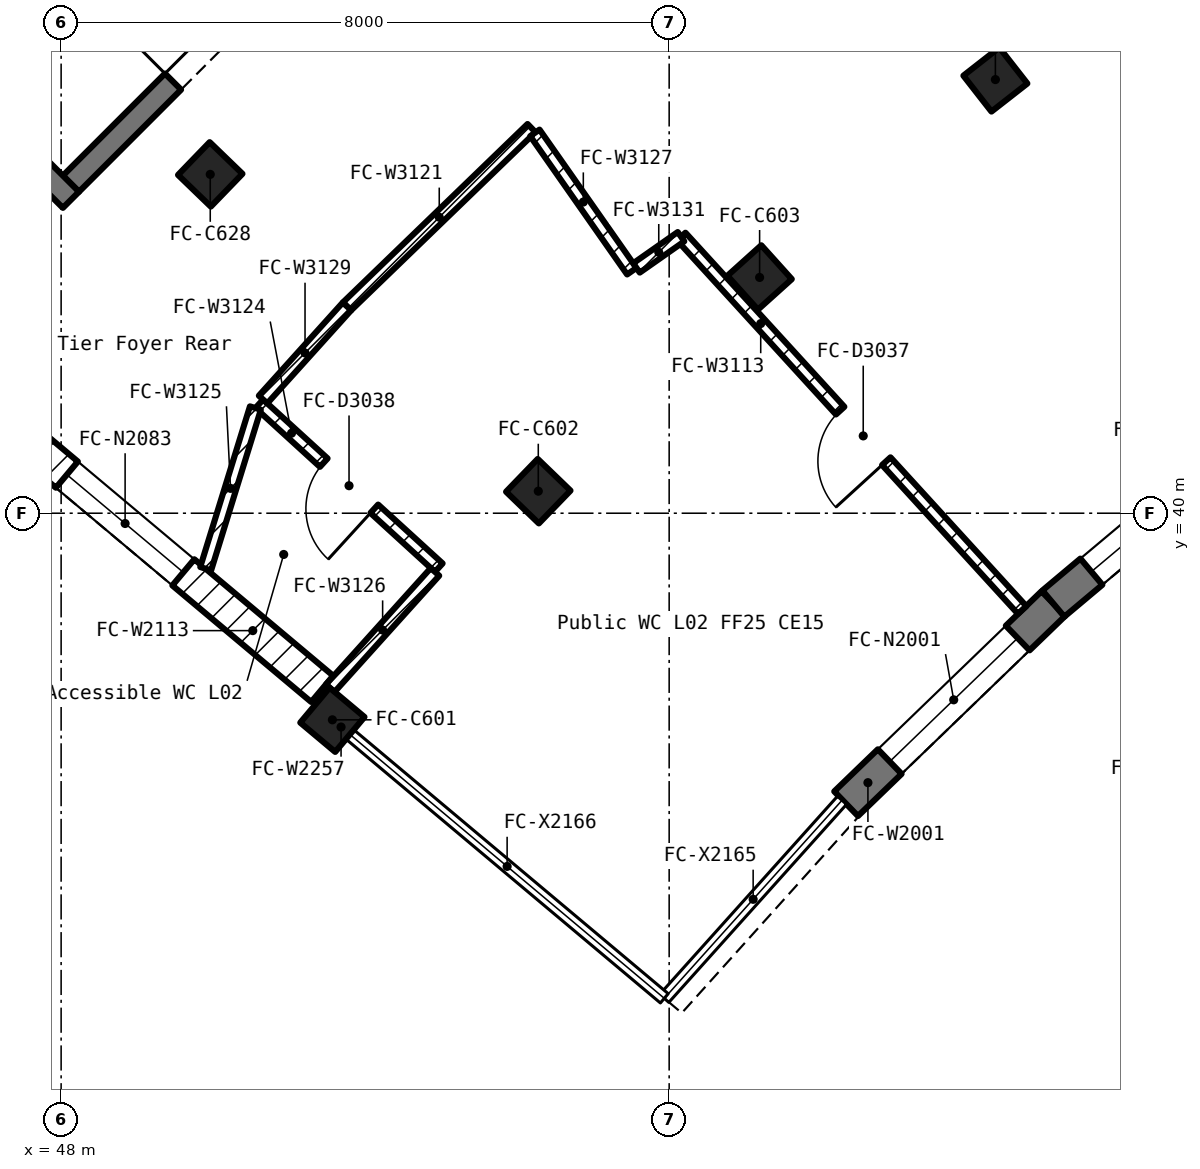
"""IFC4 building model, lengths in metres.
Left out: names, types, materials, properties, quantities, classifications, styles, units other than length and angle.
Written with IfcOpenShell. Run it as: python <this file> out.ifc"""

import sys

from ifc_helpers import new_model, si_unit, direction, frame, frame_2d, origin, origin_2d, place, context, subcontext, project, spatial, rectangle, extrude, element, fill, save


model = new_model("IFC4")
c1 = context("Model", 3, precision=1e-05, world=origin(), true_north=direction((0.0, 1.0)))
c2 = subcontext(c1, "Body", "Model", "MODEL_VIEW")
j1 = project(units=[si_unit("LENGTHUNIT", "METRE"), si_unit("PLANEANGLEUNIT", "RADIAN")], contexts=[c1])
p1 = place(None, origin())
s1 = spatial("IfcSite", under=j1, at=p1, CompositionType="ELEMENT")
p2 = place(p1, origin())
s2 = spatial("IfcBuilding", under=s1, at=p2, CompositionType="ELEMENT")
p3 = place(p2, frame((0.0, 0.0, 11.5)))
s3 = spatial("IfcBuildingStorey", under=s2, at=p3, CompositionType="ELEMENT", Elevation=11.5)
for number, where, z_axis, x_axis in (
    (1, (51.569, 37.282, 0.0), (0.0, 0.0, 1.0), (0.643, 0.766, 0.0)),
    (2, (54.278, 40.29, 0.0), (0.0, 0.0, 1.0), (0.695, 0.719, 0.0)),
    (3, (57.19, 43.102, 0.0), (0.0, 0.0, 1.0), (0.743, 0.669, 0.0)),
    (4, (60.292, 45.705, 0.0), (0.0, 0.0, 1.0), (0.788, 0.616, 0.0)),
    (5, (49.962, 44.458, 0.0), (0.0, 0.0, 1.0), (0.695, 0.719, 0.0)),
):
    element("IfcColumn", number, at=place(p3, frame(where, z_axis=z_axis, x_axis=x_axis)), inside=s3, PredefinedType="COLUMN", context=c2, shape_type="SweptSolid", body=[
        extrude(rectangle(XDim=0.6, YDim=0.6, at=origin_2d()), origin(), (0.0, 0.0, 1.0), 5.5),
    ])
p4 = place(p3, frame((58.328, 36.178, 0.0), z_axis=(0.0, 0.0, 1.0), x_axis=(0.719395911917, 0.694600260522, 0.0)))
e6 = element("IfcWall", 6, at=p4, inside=s3, PredefinedType="SOLIDWALL", context=c2, shape_type="SweptSolid", body=[
    extrude(rectangle(XDim=3.791, YDim=0.45, at=frame_2d((1.896, 0.0))), origin(), (0.0, 0.0, 1.0), 5.5),
])
p5 = place(p4, frame((0.798, 0.0, 0.9)))
e7 = element("IfcOpeningElement", 7, at=p5, cuts=e6, PredefinedType="OPENING", context=c2, shape_type="SweptSolid", body=[
    extrude(rectangle(XDim=2.34, YDim=3.4, at=frame_2d((1.17, 1.7))), frame((0.0, 0.237, 0.0), z_axis=(0.0, -1.0, 0.0), x_axis=(1.0, 0.0, 0.0)), (0.0, 0.0, 1.0), 0.474),
])
p6 = place(p3, frame((61.055, 38.811, 0.0), z_axis=(0.0, 0.0, 1.0), x_axis=(0.766009592259, 0.642829141038, 0.0)))
e8 = element("IfcWall", 8, at=p6, inside=s3, PredefinedType="SOLIDWALL", context=c2, shape_type="SweptSolid", body=[
    extrude(rectangle(XDim=3.645, YDim=0.45, at=frame_2d((1.822, 0.0))), origin(), (0.0, 0.0, 1.0), 5.5),
])
p7 = place(p6, frame((0.653, 0.0, 0.9)))
e9 = element("IfcOpeningElement", 9, at=p7, cuts=e8, PredefinedType="OPENING", context=c2, shape_type="SweptSolid", body=[
    extrude(rectangle(XDim=2.34, YDim=3.4, at=frame_2d((1.17, 1.7))), frame((0.0, 0.237, 0.0), z_axis=(0.0, -1.0, 0.0), x_axis=(1.0, 0.0, 0.0)), (0.0, 0.0, 1.0), 0.474),
])
p8 = place(p3, frame((51.435, 37.689, 0.0), z_axis=(0.0, 0.0, 1.0), x_axis=(-0.766076492063, 0.642749413308, 0.0)))
e10 = element("IfcWall", 10, at=p8, inside=s3, PredefinedType="SOLIDWALL", context=c2, shape_type="SweptSolid", body=[
    extrude(rectangle(XDim=6.236, YDim=0.45, at=frame_2d((3.118, 0.0))), origin(), (0.0, 0.0, 1.0), 4.48),
])
p9 = place(p8, frame((2.385, 0.0, 1.0)))
e11 = element("IfcOpeningElement", 11, at=p9, cuts=e10, PredefinedType="OPENING", context=c2, shape_type="SweptSolid", body=[
    extrude(rectangle(XDim=2.0, YDim=2.8, at=frame_2d((1.0, 1.4))), frame((0.0, 0.237, 0.0), z_axis=(0.0, -1.0, 0.0), x_axis=(1.0, 0.0, 0.0)), (0.0, 0.0, 1.0), 0.474),
])
p10 = place(p3, frame((48.129, 44.335, 0.0), z_axis=(0.0, 0.0, 1.0), x_axis=(0.707106781187, 0.707106781187, 0.0)))
e12 = element("IfcWall", 12, at=p10, inside=s3, PredefinedType="SOLIDWALL", context=c2, shape_type="SweptSolid", body=[
    extrude(rectangle(XDim=5.001, YDim=0.3, at=frame_2d((2.5, 0.0))), origin(), (0.0, 0.0, 1.0), 5.5),
])
p11 = place(p10, frame((1.9, 0.0, 0.0)))
e13 = element("IfcOpeningElement", 13, at=p11, cuts=e12, PredefinedType="OPENING", context=c2, shape_type="SweptSolid", body=[
    extrude(rectangle(XDim=1.2, YDim=2.1, at=frame_2d((0.6, 1.05))), frame((0.0, 0.162, 0.0), z_axis=(0.0, -1.0, 0.0), x_axis=(1.0, 0.0, 0.0)), (0.0, 0.0, 1.0), 0.324),
])
p12 = place(p3, frame((41.058, 51.194, 0.0), z_axis=(0.0, 0.0, 1.0), x_axis=(0.7070945738, -0.707118988363, 0.0)))
e14 = element("IfcWall", 14, at=p12, inside=s3, PredefinedType="SOLIDWALL", context=c2, shape_type="SweptSolid", body=[
    extrude(rectangle(XDim=10.0, YDim=0.3, at=frame_2d((5.0, 0.0))), origin(), (0.0, 0.0, 1.0), 5.5),
])
p13 = place(p3, frame((60.644, 38.727, 0.0), z_axis=(0.0, 0.0, 1.0), x_axis=(-0.674225851887, 0.738525220049, 0.0)))
e15 = element("IfcWall", 15, at=p13, inside=s3, PredefinedType="PARTITIONING", context=c2, shape_type="SweptSolid", body=[
    extrude(rectangle(XDim=6.652, YDim=0.15, at=frame_2d((3.326, 0.0))), origin(), (0.0, 0.0, 1.0), 4.35),
])
p14 = place(p13, frame((2.651, 0.0, 0.0)))
e16 = element("IfcOpeningElement", 16, at=p14, cuts=e15, PredefinedType="OPENING", context=c2, shape_type="SweptSolid", body=[
    extrude(rectangle(XDim=0.9, YDim=2.1, at=frame_2d((0.45, 1.05))), frame((0.0, 0.087, 0.0), z_axis=(0.0, -1.0, 0.0), x_axis=(1.0, 0.0, 0.0)), (0.0, 0.0, 1.0), 0.174),
])
p15 = place(p3, frame((54.189, 45.067, 0.0), z_axis=(0.0, 0.0, 1.0), x_axis=(-0.719150966755, -0.694853860186, 0.0)))
e17 = element("IfcWall", 17, at=p15, inside=s3, PredefinedType="PARTITIONING", context=c2, shape_type="SweptSolid", body=[
    extrude(rectangle(XDim=3.376, YDim=0.15, at=frame_2d((1.688, 0.0))), origin(), (0.0, 0.0, 1.0), 4.38),
])
p16 = place(p3, frame((52.969, 39.284, 0.0), z_axis=(0.0, 0.0, 1.0), x_axis=(-0.738587953928, 0.6741571288, 0.0)))
e18 = element("IfcWall", 18, at=p16, inside=s3, PredefinedType="PARTITIONING", context=c2, shape_type="SweptSolid", body=[
    extrude(rectangle(XDim=3.198, YDim=0.15, at=frame_2d((1.599, 0.0))), origin(), (0.0, 0.0, 1.0), 4.38),
])
p17 = place(p16, frame((1.149, 0.0, 0.0)))
e19 = element("IfcOpeningElement", 19, at=p17, cuts=e18, PredefinedType="OPENING", context=c2, shape_type="SweptSolid", body=[
    extrude(rectangle(XDim=0.9, YDim=2.1, at=frame_2d((0.45, 1.05))), frame((0.0, 0.087, 0.0), z_axis=(0.0, -1.0, 0.0), x_axis=(1.0, 0.0, 0.0)), (0.0, 0.0, 1.0), 0.174),
])
p18 = place(p3, frame((50.556, 41.384, 0.0), z_axis=(0.0, 0.0, 1.0), x_axis=(-0.295465570402, -0.955353388389, 0.0)))
e20 = element("IfcWall", 20, at=p18, inside=s3, PredefinedType="PARTITIONING", context=c2, shape_type="SweptSolid", body=[
    extrude(rectangle(XDim=2.213, YDim=0.15, at=frame_2d((1.106, 0.0))), origin(), (0.0, 0.0, 1.0), 4.38),
])
p19 = place(p3, frame((51.541, 37.698, 0.0), z_axis=(0.0, 0.0, 1.0), x_axis=(0.669207075993, 0.743075964785, 0.0)))
e21 = element("IfcWall", 21, at=p19, inside=s3, PredefinedType="PARTITIONING", context=c2, shape_type="SweptSolid", body=[
    extrude(rectangle(XDim=2.059, YDim=0.15, at=frame_2d((1.03, 0.0))), origin(), (0.0, 0.0, 1.0), 4.38),
])
p20 = place(p3, frame((55.508, 43.184, 0.0), z_axis=(0.0, 0.0, 1.0), x_axis=(-0.57384571694, 0.818963426014, 0.0)))
e22 = element("IfcWall", 22, at=p20, inside=s3, PredefinedType="PARTITIONING", context=c2, shape_type="SweptSolid", body=[
    extrude(rectangle(XDim=2.222, YDim=0.15, at=frame_2d((1.111, 0.0))), origin(), (0.0, 0.0, 1.0), 4.38),
])
p21 = place(p3, frame((51.761, 42.721, 0.0), z_axis=(0.0, 0.0, 1.0), x_axis=(-0.669512605136, -0.742800694375, 0.0)))
e23 = element("IfcWall", 23, at=p21, inside=s3, PredefinedType="PARTITIONING", context=c2, shape_type="SweptSolid", body=[
    extrude(rectangle(XDim=1.649, YDim=0.15, at=frame_2d((0.824, 0.0))), origin(), (0.0, 0.0, 1.0), 4.38),
])
p22 = place(p3, frame((56.156, 43.638, 0.0), z_axis=(0.0, 0.0, 1.0), x_axis=(-0.818750822524, -0.574149014295, 0.0)))
e24 = element("IfcWall", 24, at=p22, inside=s3, PredefinedType="PARTITIONING", context=c2, shape_type="SweptSolid", body=[
    extrude(rectangle(XDim=0.716, YDim=0.15, at=frame_2d((0.358, 0.0))), origin(), (0.0, 0.0, 1.0), 4.38),
])
p23 = place(p3, frame((51.8, 37.089, 0.0), z_axis=(0.0, 0.0, 1.0), x_axis=(-0.767105498424, 0.641520969485, 0.0)))
e25 = element("IfcWall", 25, at=p23, inside=s3, PredefinedType="SOLIDWALL", context=c2, shape_type="SweptSolid", body=[
    extrude(rectangle(XDim=0.305, YDim=0.18, at=frame_2d((0.153, 0.0))), origin(), (0.0, 0.0, 1.0), 4.65),
])
p24 = place(p5, origin())
e26 = element("IfcWindow", 26, at=p24, inside=s3, PartitioningType="TRIPLE_PANEL_VERTICAL", PredefinedType="WINDOW", context=c2, shape_type="SweptSolid", body=[
    extrude(rectangle(XDim=2.34, YDim=3.4, at=frame_2d((1.17, 1.7))), frame((0.0, 0.03, 0.0), z_axis=(0.0, -1.0, 0.0), x_axis=(1.0, 0.0, 0.0)), (0.0, 0.0, 1.0), 0.06),
])
fill(e7, e26)
p25 = place(p7, origin())
e27 = element("IfcWindow", 27, at=p25, inside=s3, PartitioningType="TRIPLE_PANEL_VERTICAL", PredefinedType="WINDOW", context=c2, shape_type="SweptSolid", body=[
    extrude(rectangle(XDim=2.34, YDim=3.4, at=frame_2d((1.17, 1.7))), frame((0.0, 0.03, 0.0), z_axis=(0.0, -1.0, 0.0), x_axis=(1.0, 0.0, 0.0)), (0.0, 0.0, 1.0), 0.06),
])
fill(e9, e27)
p26 = place(p9, origin())
e28 = element("IfcWindow", 28, at=p26, inside=s3, PartitioningType="DOUBLE_PANEL_VERTICAL", PredefinedType="WINDOW", context=c2, shape_type="SweptSolid", body=[
    extrude(rectangle(XDim=2.0, YDim=2.8, at=frame_2d((1.0, 1.4))), frame((0.0, 0.03, 0.0), z_axis=(0.0, -1.0, 0.0), x_axis=(1.0, 0.0, 0.0)), (0.0, 0.0, 1.0), 0.06),
])
fill(e11, e28)
p27 = place(p11, origin())
e29 = element("IfcDoor", 29, at=p27, inside=s3, OperationType="SINGLE_SWING_LEFT", PredefinedType="DOOR", context=c2, shape_type="SweptSolid", body=[
    extrude(rectangle(XDim=1.2, YDim=2.1, at=frame_2d((0.6, 1.05))), frame((0.0, 0.025, 0.0), z_axis=(0.0, -1.0, 0.0), x_axis=(1.0, 0.0, 0.0)), (0.0, 0.0, 1.0), 0.05),
])
fill(e13, e29)
p28 = place(p14, origin())
e30 = element("IfcDoor", 30, at=p28, inside=s3, OperationType="SINGLE_SWING_LEFT", PredefinedType="DOOR", context=c2, shape_type="SweptSolid", body=[
    extrude(rectangle(XDim=0.9, YDim=2.1, at=frame_2d((0.45, 1.05))), frame((0.0, 0.025, 0.0), z_axis=(0.0, -1.0, 0.0), x_axis=(1.0, 0.0, 0.0)), (0.0, 0.0, 1.0), 0.05),
])
fill(e16, e30)
p29 = place(p17, origin())
e31 = element("IfcDoor", 31, at=p29, inside=s3, OperationType="SINGLE_SWING_LEFT", PredefinedType="DOOR", context=c2, shape_type="SweptSolid", body=[
    extrude(rectangle(XDim=0.9, YDim=2.1, at=frame_2d((0.45, 1.05))), frame((0.0, 0.025, 0.0), z_axis=(0.0, -1.0, 0.0), x_axis=(1.0, 0.0, 0.0)), (0.0, 0.0, 1.0), 0.05),
])
fill(e19, e31)
save(model, sys.argv[1])
